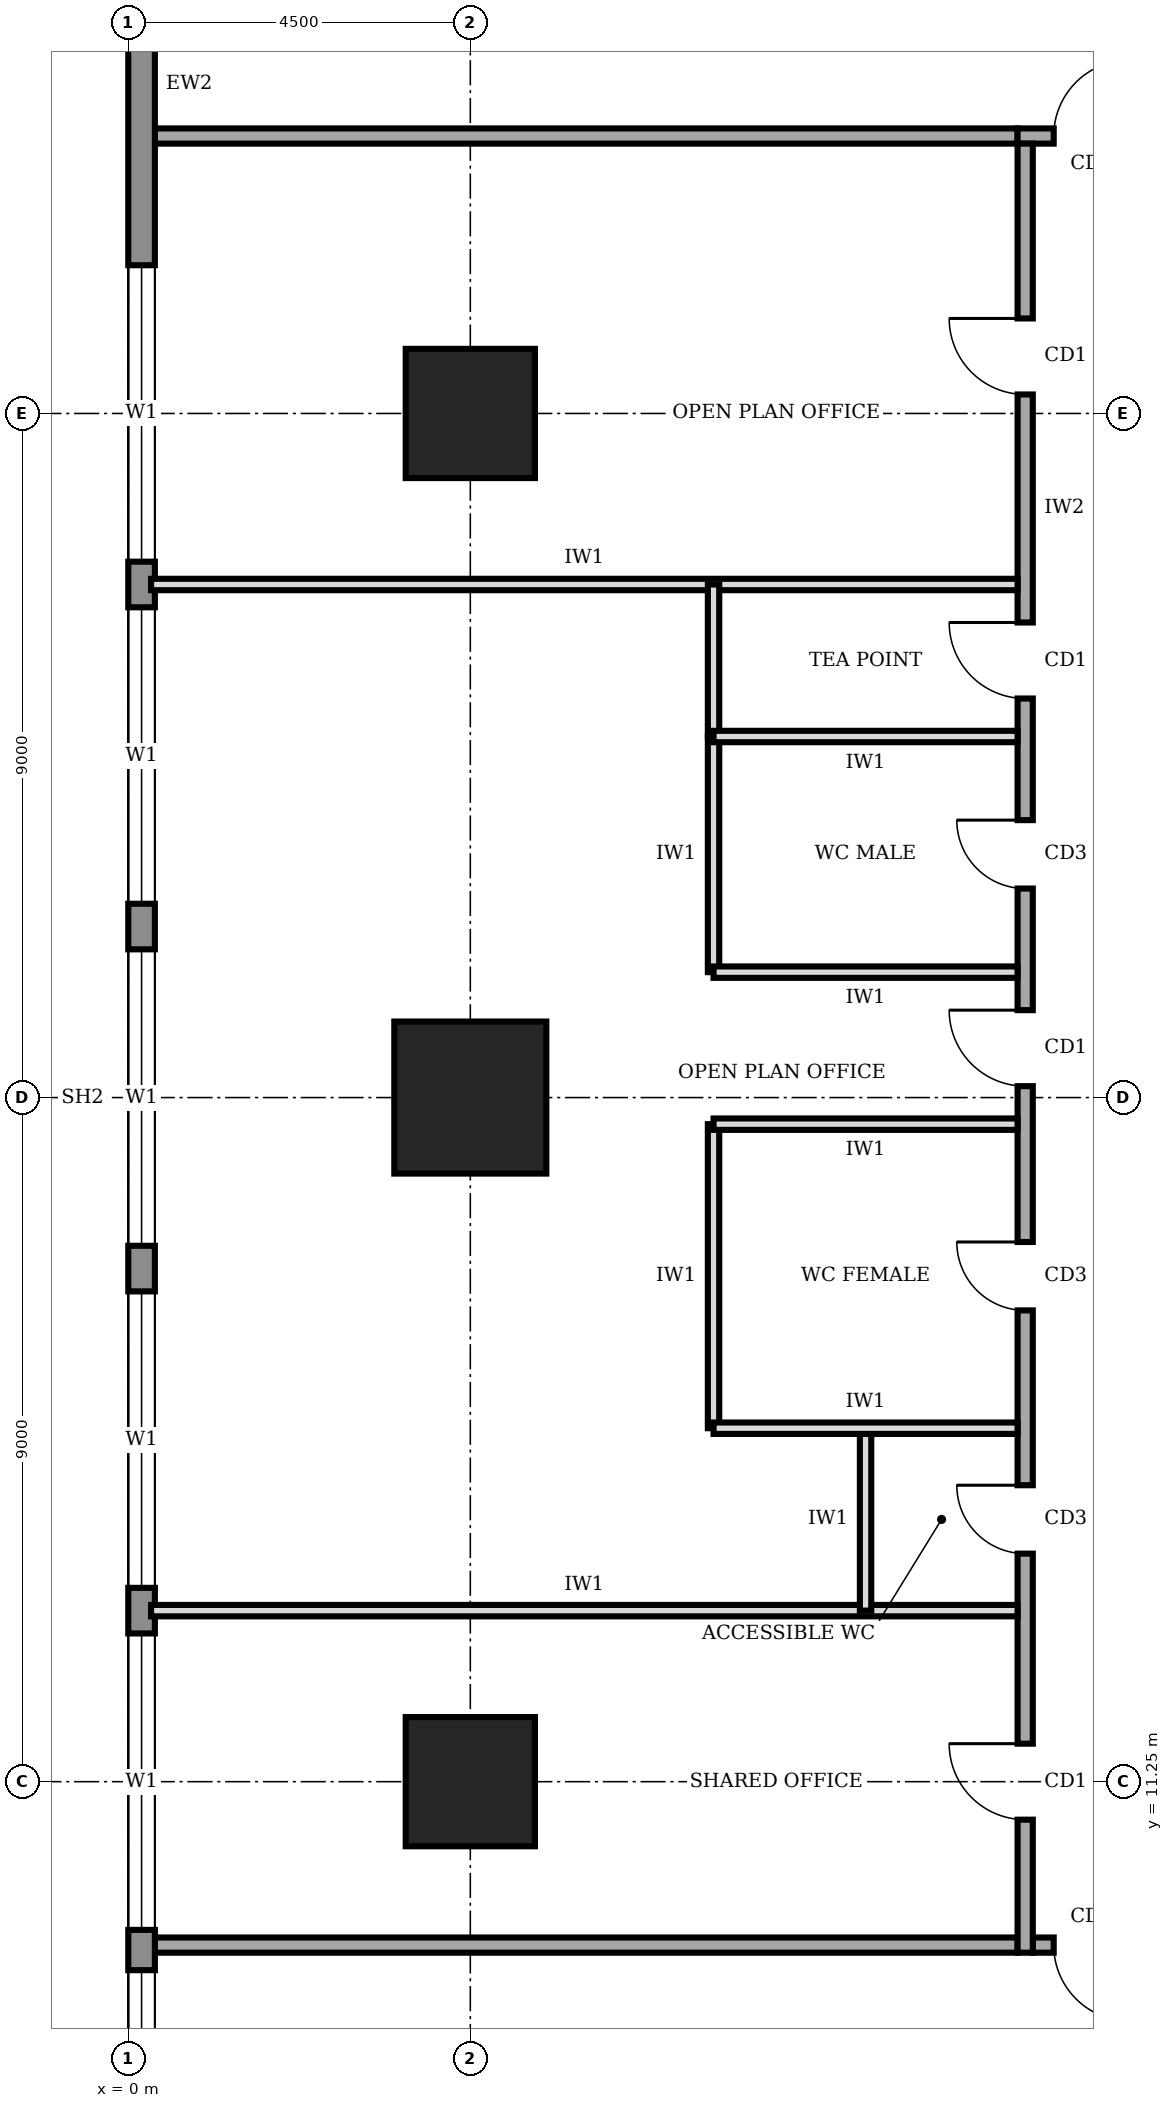
"""IFC4 building model, lengths in metres.
Left out: names, types, materials, properties, quantities, classifications, styles, units other than length and angle.
Written with IfcOpenShell. Run it as: python <this file> out.ifc"""

import sys

from ifc_helpers import new_model, si_unit, direction, frame, frame_2d, origin, origin_2d, place, context, subcontext, project, spatial, rectangle, extrude, element, fill, save


model = new_model("IFC4")
c1 = context("Model", 3, precision=1e-05, world=origin(), true_north=direction((0.0, 1.0)))
c2 = subcontext(c1, "Body", "Model", "MODEL_VIEW")
j1 = project(units=[si_unit("LENGTHUNIT", "METRE"), si_unit("PLANEANGLEUNIT", "RADIAN")], contexts=[c1])
p1 = place(None, origin())
s1 = spatial("IfcSite", under=j1, at=p1, CompositionType="ELEMENT")
p2 = place(p1, origin())
s2 = spatial("IfcBuilding", under=s1, at=p2, CompositionType="ELEMENT")
p3 = place(p2, frame((0.0, 0.0, 281.0)))
s3 = spatial("IfcBuildingStorey", under=s2, at=p3, CompositionType="ELEMENT", Elevation=281.0)
p4 = place(p3, frame((4.5, 11.25, 0.0), z_axis=(0.0, 0.0, 1.0), x_axis=(1.0, 0.0, 0.0)))
e1 = element("IfcColumn", 1, at=p4, inside=s3, PredefinedType="COLUMN", context=c2, shape_type="SweptSolid", body=[
    extrude(rectangle(XDim=1.7, YDim=1.7, at=origin_2d()), origin(), (0.0, 0.0, 1.0), 4.0),
])
p5 = place(p3, frame((4.5, 20.25, 0.0), z_axis=(0.0, 0.0, 1.0), x_axis=(1.0, 0.0, 0.0)))
e2 = element("IfcColumn", 2, at=p5, inside=s3, PredefinedType="COLUMN", context=c2, shape_type="SweptSolid", body=[
    extrude(rectangle(XDim=2.0, YDim=2.0, at=origin_2d()), origin(), (0.0, 0.0, 1.0), 4.0),
])
p6 = place(p3, frame((4.5, 29.25, 0.0), z_axis=(0.0, 0.0, 1.0), x_axis=(1.0, 0.0, 0.0)))
e3 = element("IfcColumn", 3, at=p6, inside=s3, PredefinedType="COLUMN", context=c2, shape_type="SweptSolid", body=[
    extrude(rectangle(XDim=1.7, YDim=1.7, at=origin_2d()), origin(), (0.0, 0.0, 1.0), 4.0),
])
p7 = place(p3, frame((0.175, 35.98, 0.0), z_axis=(0.0, 0.0, 1.0), x_axis=(0.0, -1.0, 0.0)))
e4 = element("IfcWall", 4, at=p7, inside=s3, PredefinedType="STANDARD", context=c2, shape_type="SweptSolid", body=[
    extrude(rectangle(XDim=31.46, YDim=0.35, at=frame_2d((15.73, 0.0))), origin(), (0.0, 0.0, 1.0), 3.75),
])
p8 = place(p7, frame((27.21, 0.0, 0.9)))
e5 = element("IfcOpeningElement", 5, at=p8, cuts=e4, PredefinedType="OPENING", context=c2, shape_type="SweptSolid", body=[
    extrude(rectangle(XDim=3.9, YDim=2.2, at=frame_2d((1.95, 1.1))), frame((0.0, 0.185, 0.0), z_axis=(0.0, -1.0, 0.0), x_axis=(1.0, 0.0, 0.0)), (0.0, 0.0, 1.0), 0.37),
])
p9 = place(p7, frame((22.78, 0.0, 0.9)))
e6 = element("IfcOpeningElement", 6, at=p9, cuts=e4, PredefinedType="OPENING", context=c2, shape_type="SweptSolid", body=[
    extrude(rectangle(XDim=3.9, YDim=2.2, at=frame_2d((1.95, 1.1))), frame((0.0, 0.185, 0.0), z_axis=(0.0, -1.0, 0.0), x_axis=(1.0, 0.0, 0.0)), (0.0, 0.0, 1.0), 0.37),
])
p10 = place(p7, frame((18.28, 0.0, 0.9)))
e7 = element("IfcOpeningElement", 7, at=p10, cuts=e4, PredefinedType="OPENING", context=c2, shape_type="SweptSolid", body=[
    extrude(rectangle(XDim=3.9, YDim=2.2, at=frame_2d((1.95, 1.1))), frame((0.0, 0.185, 0.0), z_axis=(0.0, -1.0, 0.0), x_axis=(1.0, 0.0, 0.0)), (0.0, 0.0, 1.0), 0.37),
])
p11 = place(p7, frame((13.78, 0.0, 0.9)))
e8 = element("IfcOpeningElement", 8, at=p11, cuts=e4, PredefinedType="OPENING", context=c2, shape_type="SweptSolid", body=[
    extrude(rectangle(XDim=3.9, YDim=2.2, at=frame_2d((1.95, 1.1))), frame((0.0, 0.185, 0.0), z_axis=(0.0, -1.0, 0.0), x_axis=(1.0, 0.0, 0.0)), (0.0, 0.0, 1.0), 0.37),
])
p12 = place(p7, frame((9.28, 0.0, 0.9)))
e9 = element("IfcOpeningElement", 9, at=p12, cuts=e4, PredefinedType="OPENING", context=c2, shape_type="SweptSolid", body=[
    extrude(rectangle(XDim=3.9, YDim=2.2, at=frame_2d((1.95, 1.1))), frame((0.0, 0.185, 0.0), z_axis=(0.0, -1.0, 0.0), x_axis=(1.0, 0.0, 0.0)), (0.0, 0.0, 1.0), 0.37),
])
p13 = place(p7, frame((4.78, 0.0, 0.9)))
e10 = element("IfcOpeningElement", 10, at=p13, cuts=e4, PredefinedType="OPENING", context=c2, shape_type="SweptSolid", body=[
    extrude(rectangle(XDim=3.9, YDim=2.2, at=frame_2d((1.95, 1.1))), frame((0.0, 0.185, 0.0), z_axis=(0.0, -1.0, 0.0), x_axis=(1.0, 0.0, 0.0)), (0.0, 0.0, 1.0), 0.37),
])
p14 = place(p3, frame((11.9, 9.1, 0.0), z_axis=(0.0, 0.0, 1.0), x_axis=(1.0, 0.0, 0.0)))
e11 = element("IfcWall", 11, at=p14, inside=s3, PredefinedType="SOLIDWALL", context=c2, shape_type="SweptSolid", body=[
    extrude(rectangle(XDim=16.9, YDim=0.2, at=frame_2d((8.45, 0.0))), origin(), (0.0, 0.0, 1.0), 3.75),
])
p15 = place(p14, frame((0.275, 0.0, 0.0)))
e12 = element("IfcOpeningElement", 12, at=p15, cuts=e11, PredefinedType="OPENING", context=c2, shape_type="SweptSolid", body=[
    extrude(rectangle(XDim=1.0, YDim=2.1, at=frame_2d((0.5, 1.05))), frame((0.0, 0.11, 0.0), z_axis=(0.0, -1.0, 0.0), x_axis=(1.0, 0.0, 0.0)), (0.0, 0.0, 1.0), 0.22),
])
p16 = place(p14, frame((8.35, 0.0, 0.0)))
e13 = element("IfcOpeningElement", 13, at=p16, cuts=e11, PredefinedType="OPENING", context=c2, shape_type="SweptSolid", body=[
    extrude(rectangle(XDim=1.8, YDim=2.1, at=frame_2d((0.9, 1.05))), frame((0.0, 0.11, 0.0), z_axis=(0.0, -1.0, 0.0), x_axis=(1.0, 0.0, 0.0)), (0.0, 0.0, 1.0), 0.22),
])
p17 = place(p3, frame((28.6, 32.9, 0.0), z_axis=(0.0, 0.0, 1.0), x_axis=(-1.0, 0.0, 0.0)))
e14 = element("IfcWall", 14, at=p17, inside=s3, PredefinedType="SOLIDWALL", context=c2, shape_type="SweptSolid", body=[
    extrude(rectangle(XDim=16.9, YDim=0.2, at=frame_2d((8.45, 0.0))), origin(), (0.0, 0.0, 1.0), 3.75),
])
p18 = place(p17, frame((15.425, 0.0, 0.0)))
e15 = element("IfcOpeningElement", 15, at=p18, cuts=e14, PredefinedType="OPENING", context=c2, shape_type="SweptSolid", body=[
    extrude(rectangle(XDim=1.0, YDim=2.1, at=frame_2d((0.5, 1.05))), frame((0.0, 0.11, 0.0), z_axis=(0.0, -1.0, 0.0), x_axis=(1.0, 0.0, 0.0)), (0.0, 0.0, 1.0), 0.22),
])
p19 = place(p17, frame((7.45, 0.0, 0.0)))
e16 = element("IfcOpeningElement", 16, at=p19, cuts=e14, PredefinedType="OPENING", context=c2, shape_type="SweptSolid", body=[
    extrude(rectangle(XDim=1.8, YDim=2.1, at=frame_2d((0.9, 1.05))), frame((0.0, 0.11, 0.0), z_axis=(0.0, -1.0, 0.0), x_axis=(1.0, 0.0, 0.0)), (0.0, 0.0, 1.0), 0.22),
])
p20 = place(p17, frame((0.275, 0.0, 0.0)))
e17 = element("IfcOpeningElement", 17, at=p20, cuts=e14, PredefinedType="OPENING", context=c2, shape_type="SweptSolid", body=[
    extrude(rectangle(XDim=1.0, YDim=2.1, at=frame_2d((0.5, 1.05))), frame((0.0, 0.11, 0.0), z_axis=(0.0, -1.0, 0.0), x_axis=(1.0, 0.0, 0.0)), (0.0, 0.0, 1.0), 0.22),
])
p21 = place(p3, frame((11.8, 32.8, 0.0), z_axis=(0.0, 0.0, 1.0), x_axis=(0.0, -1.0, 0.0)))
e18 = element("IfcWall", 18, at=p21, inside=s3, PredefinedType="SOLIDWALL", context=c2, shape_type="SweptSolid", body=[
    extrude(rectangle(XDim=23.8, YDim=0.2, at=frame_2d((11.9, 0.0))), origin(), (0.0, 0.0, 1.0), 3.75),
])
p22 = place(p21, frame((21.05, 0.0, 0.0)))
e19 = element("IfcOpeningElement", 19, at=p22, cuts=e18, PredefinedType="OPENING", context=c2, shape_type="SweptSolid", body=[
    extrude(rectangle(XDim=1.0, YDim=2.1, at=frame_2d((0.5, 1.05))), frame((0.0, 0.11, 0.0), z_axis=(0.0, -1.0, 0.0), x_axis=(1.0, 0.0, 0.0)), (0.0, 0.0, 1.0), 0.22),
])
p23 = place(p21, frame((17.65, 0.0, 0.0)))
e20 = element("IfcOpeningElement", 20, at=p23, cuts=e18, PredefinedType="OPENING", context=c2, shape_type="SweptSolid", body=[
    extrude(rectangle(XDim=0.9, YDim=2.1, at=frame_2d((0.45, 1.05))), frame((0.0, 0.11, 0.0), z_axis=(0.0, -1.0, 0.0), x_axis=(1.0, 0.0, 0.0)), (0.0, 0.0, 1.0), 0.22),
])
p24 = place(p21, frame((14.45, 0.0, 0.0)))
e21 = element("IfcOpeningElement", 21, at=p24, cuts=e18, PredefinedType="OPENING", context=c2, shape_type="SweptSolid", body=[
    extrude(rectangle(XDim=0.9, YDim=2.1, at=frame_2d((0.45, 1.05))), frame((0.0, 0.11, 0.0), z_axis=(0.0, -1.0, 0.0), x_axis=(1.0, 0.0, 0.0)), (0.0, 0.0, 1.0), 0.22),
])
p25 = place(p21, frame((8.9, 0.0, 0.0)))
e22 = element("IfcOpeningElement", 22, at=p25, cuts=e18, PredefinedType="OPENING", context=c2, shape_type="SweptSolid", body=[
    extrude(rectangle(XDim=0.9, YDim=2.1, at=frame_2d((0.45, 1.05))), frame((0.0, 0.11, 0.0), z_axis=(0.0, -1.0, 0.0), x_axis=(1.0, 0.0, 0.0)), (0.0, 0.0, 1.0), 0.22),
])
p26 = place(p21, frame((6.3, 0.0, 0.0)))
e23 = element("IfcOpeningElement", 23, at=p26, cuts=e18, PredefinedType="OPENING", context=c2, shape_type="SweptSolid", body=[
    extrude(rectangle(XDim=1.0, YDim=2.1, at=frame_2d((0.5, 1.05))), frame((0.0, 0.11, 0.0), z_axis=(0.0, -1.0, 0.0), x_axis=(1.0, 0.0, 0.0)), (0.0, 0.0, 1.0), 0.22),
])
p27 = place(p21, frame((11.4, 0.0, 0.0)))
e24 = element("IfcOpeningElement", 24, at=p27, cuts=e18, PredefinedType="OPENING", context=c2, shape_type="SweptSolid", body=[
    extrude(rectangle(XDim=1.0, YDim=2.1, at=frame_2d((0.5, 1.05))), frame((0.0, 0.11, 0.0), z_axis=(0.0, -1.0, 0.0), x_axis=(1.0, 0.0, 0.0)), (0.0, 0.0, 1.0), 0.22),
])
p28 = place(p21, frame((2.3, 0.0, 0.0)))
e25 = element("IfcOpeningElement", 25, at=p28, cuts=e18, PredefinedType="OPENING", context=c2, shape_type="SweptSolid", body=[
    extrude(rectangle(XDim=1.0, YDim=2.1, at=frame_2d((0.5, 1.05))), frame((0.0, 0.11, 0.0), z_axis=(0.0, -1.0, 0.0), x_axis=(1.0, 0.0, 0.0)), (0.0, 0.0, 1.0), 0.22),
])
for number, where, z_axis, x_axis in (
    (26, (0.3, 9.1, 0.0), (0.0, 0.0, 1.0), (1.0, 0.0, 0.0)),
    (27, (0.3, 32.9, 0.0), (0.0, 0.0, 1.0), (1.0, 0.0, 0.0)),
):
    element("IfcWall", number, at=place(p3, frame(where, z_axis=z_axis, x_axis=x_axis)), inside=s3, PredefinedType="SOLIDWALL", context=c2, shape_type="SweptSolid", body=[
        extrude(rectangle(XDim=11.4, YDim=0.2, at=frame_2d((5.7, 0.0))), origin(), (0.0, 0.0, 1.0), 3.75),
    ])
for number, where, z_axis, x_axis in (
    (28, (0.3, 13.5, 0.0), (0.0, 0.0, 1.0), (1.0, 0.0, 0.0)),
    (29, (0.3, 27.0, 0.0), (0.0, 0.0, 1.0), (1.0, 0.0, 0.0)),
):
    element("IfcWall", number, at=place(p3, frame(where, z_axis=z_axis, x_axis=x_axis)), inside=s3, PredefinedType="PARTITIONING", context=c2, shape_type="SweptSolid", body=[
        extrude(rectangle(XDim=11.4, YDim=0.15, at=frame_2d((5.7, 0.0))), origin(), (0.0, 0.0, 1.0), 3.75),
    ])
p29 = place(p3, frame((11.7, 15.9, 0.0), z_axis=(0.0, 0.0, 1.0), x_axis=(-1.0, 0.0, 0.0)))
e30 = element("IfcWall", 30, at=p29, inside=s3, PredefinedType="PARTITIONING", context=c2, shape_type="SweptSolid", body=[
    extrude(rectangle(XDim=4.0, YDim=0.15, at=frame_2d((2.0, 0.0))), origin(), (0.0, 0.0, 1.0), 3.75),
])
p30 = place(p3, frame((11.7, 19.9, 0.0), z_axis=(0.0, 0.0, 1.0), x_axis=(-1.0, 0.0, 0.0)))
e31 = element("IfcWall", 31, at=p30, inside=s3, PredefinedType="PARTITIONING", context=c2, shape_type="SweptSolid", body=[
    extrude(rectangle(XDim=4.0, YDim=0.15, at=frame_2d((2.0, 0.0))), origin(), (0.0, 0.0, 1.0), 2.85),
])
for number, where, z_axis, x_axis in (
    (32, (11.7, 21.9, 0.0), (0.0, 0.0, 1.0), (-1.0, 0.0, 0.0)),
    (33, (11.7, 25.0, 0.0), (0.0, 0.0, 1.0), (-1.0, 0.0, 0.0)),
):
    element("IfcWall", number, at=place(p3, frame(where, z_axis=z_axis, x_axis=x_axis)), inside=s3, PredefinedType="PARTITIONING", context=c2, shape_type="SweptSolid", body=[
        extrude(rectangle(XDim=4.0, YDim=0.15, at=frame_2d((2.0, 0.0))), origin(), (0.0, 0.0, 1.0), 3.75),
    ])
p31 = place(p3, frame((9.7, 13.5, 0.0), z_axis=(0.0, 0.0, 1.0), x_axis=(0.0, 1.0, 0.0)))
e34 = element("IfcWall", 34, at=p31, inside=s3, PredefinedType="PARTITIONING", context=c2, shape_type="SweptSolid", body=[
    extrude(rectangle(XDim=2.4, YDim=0.15, at=frame_2d((1.2, 0.0))), origin(), (0.0, 0.0, 1.0), 3.75),
])
p32 = place(p3, frame((7.7, 15.9, 0.0), z_axis=(0.0, 0.0, 1.0), x_axis=(0.0, 1.0, 0.0)))
e35 = element("IfcWall", 35, at=p32, inside=s3, PredefinedType="PARTITIONING", context=c2, shape_type="SweptSolid", body=[
    extrude(rectangle(XDim=4.0, YDim=0.15, at=frame_2d((2.0, 0.0))), origin(), (0.0, 0.0, 1.0), 3.75),
])
p33 = place(p3, frame((7.7, 21.9, 0.0), z_axis=(0.0, 0.0, 1.0), x_axis=(0.0, 1.0, 0.0)))
e36 = element("IfcWall", 36, at=p33, inside=s3, PredefinedType="PARTITIONING", context=c2, shape_type="SweptSolid", body=[
    extrude(rectangle(XDim=3.1, YDim=0.15, at=frame_2d((1.55, 0.0))), origin(), (0.0, 0.0, 1.0), 3.75),
])
p34 = place(p3, frame((7.7, 25.0, 0.0), z_axis=(0.0, 0.0, 1.0), x_axis=(0.0, 1.0, 0.0)))
e37 = element("IfcWall", 37, at=p34, inside=s3, PredefinedType="PARTITIONING", context=c2, shape_type="SweptSolid", body=[
    extrude(rectangle(XDim=2.0, YDim=0.15, at=frame_2d((1.0, 0.0))), origin(), (0.0, 0.0, 1.0), 3.75),
])
p35 = place(p8, origin())
e38 = element("IfcWindow", 38, at=p35, inside=s3, PartitioningType="SINGLE_PANEL", PredefinedType="WINDOW", context=c2, shape_type="SweptSolid", body=[
    extrude(rectangle(XDim=3.9, YDim=2.2, at=frame_2d((1.95, 1.1))), frame((0.0, 0.03, 0.0), z_axis=(0.0, -1.0, 0.0), x_axis=(1.0, 0.0, 0.0)), (0.0, 0.0, 1.0), 0.06),
])
fill(e5, e38)
p36 = place(p9, origin())
e39 = element("IfcWindow", 39, at=p36, inside=s3, PartitioningType="SINGLE_PANEL", PredefinedType="WINDOW", context=c2, shape_type="SweptSolid", body=[
    extrude(rectangle(XDim=3.9, YDim=2.2, at=frame_2d((1.95, 1.1))), frame((0.0, 0.03, 0.0), z_axis=(0.0, -1.0, 0.0), x_axis=(1.0, 0.0, 0.0)), (0.0, 0.0, 1.0), 0.06),
])
fill(e6, e39)
p37 = place(p10, origin())
e40 = element("IfcWindow", 40, at=p37, inside=s3, PartitioningType="SINGLE_PANEL", PredefinedType="WINDOW", context=c2, shape_type="SweptSolid", body=[
    extrude(rectangle(XDim=3.9, YDim=2.2, at=frame_2d((1.95, 1.1))), frame((0.0, 0.03, 0.0), z_axis=(0.0, -1.0, 0.0), x_axis=(1.0, 0.0, 0.0)), (0.0, 0.0, 1.0), 0.06),
])
fill(e7, e40)
p38 = place(p11, origin())
e41 = element("IfcWindow", 41, at=p38, inside=s3, PartitioningType="SINGLE_PANEL", PredefinedType="WINDOW", context=c2, shape_type="SweptSolid", body=[
    extrude(rectangle(XDim=3.9, YDim=2.2, at=frame_2d((1.95, 1.1))), frame((0.0, 0.03, 0.0), z_axis=(0.0, -1.0, 0.0), x_axis=(1.0, 0.0, 0.0)), (0.0, 0.0, 1.0), 0.06),
])
fill(e8, e41)
p39 = place(p12, origin())
e42 = element("IfcWindow", 42, at=p39, inside=s3, PartitioningType="SINGLE_PANEL", PredefinedType="WINDOW", context=c2, shape_type="SweptSolid", body=[
    extrude(rectangle(XDim=3.9, YDim=2.2, at=frame_2d((1.95, 1.1))), frame((0.0, 0.03, 0.0), z_axis=(0.0, -1.0, 0.0), x_axis=(1.0, 0.0, 0.0)), (0.0, 0.0, 1.0), 0.06),
])
fill(e9, e42)
p40 = place(p13, origin())
e43 = element("IfcWindow", 43, at=p40, inside=s3, PartitioningType="SINGLE_PANEL", PredefinedType="WINDOW", context=c2, shape_type="SweptSolid", body=[
    extrude(rectangle(XDim=3.9, YDim=2.2, at=frame_2d((1.95, 1.1))), frame((0.0, 0.03, 0.0), z_axis=(0.0, -1.0, 0.0), x_axis=(1.0, 0.0, 0.0)), (0.0, 0.0, 1.0), 0.06),
])
fill(e10, e43)
p41 = place(p15, frame((1.0, 0.0, 0.0), z_axis=(0.0, 0.0, 1.0), x_axis=(-1.0, 0.0, 0.0)))
e44 = element("IfcDoor", 44, at=p41, inside=s3, OperationType="SINGLE_SWING_LEFT", PredefinedType="DOOR", context=c2, shape_type="SweptSolid", body=[
    extrude(rectangle(XDim=1.0, YDim=2.1, at=frame_2d((0.5, 1.05))), frame((0.0, 0.025, 0.0), z_axis=(0.0, -1.0, 0.0), x_axis=(1.0, 0.0, 0.0)), (0.0, 0.0, 1.0), 0.05),
])
fill(e12, e44)
p42 = place(p18, frame((1.0, 0.0, 0.0), z_axis=(0.0, 0.0, 1.0), x_axis=(-1.0, 0.0, 0.0)))
e45 = element("IfcDoor", 45, at=p42, inside=s3, OperationType="SINGLE_SWING_RIGHT", PredefinedType="DOOR", context=c2, shape_type="SweptSolid", body=[
    extrude(rectangle(XDim=1.0, YDim=2.1, at=frame_2d((0.5, 1.05))), frame((0.0, 0.025, 0.0), z_axis=(0.0, -1.0, 0.0), x_axis=(1.0, 0.0, 0.0)), (0.0, 0.0, 1.0), 0.05),
])
fill(e15, e45)
p43 = place(p22, frame((1.0, 0.0, 0.0), z_axis=(0.0, 0.0, 1.0), x_axis=(-1.0, 0.0, 0.0)))
e46 = element("IfcDoor", 46, at=p43, inside=s3, OperationType="SINGLE_SWING_RIGHT", PredefinedType="DOOR", context=c2, shape_type="SweptSolid", body=[
    extrude(rectangle(XDim=1.0, YDim=2.1, at=frame_2d((0.5, 1.05))), frame((0.0, 0.025, 0.0), z_axis=(0.0, -1.0, 0.0), x_axis=(1.0, 0.0, 0.0)), (0.0, 0.0, 1.0), 0.05),
])
fill(e19, e46)
p44 = place(p23, frame((0.9, 0.0, 0.0), z_axis=(0.0, 0.0, 1.0), x_axis=(-1.0, 0.0, 0.0)))
e47 = element("IfcDoor", 47, at=p44, inside=s3, OperationType="SINGLE_SWING_RIGHT", PredefinedType="DOOR", context=c2, shape_type="SweptSolid", body=[
    extrude(rectangle(XDim=0.9, YDim=2.1, at=frame_2d((0.45, 1.05))), frame((0.0, 0.025, 0.0), z_axis=(0.0, -1.0, 0.0), x_axis=(1.0, 0.0, 0.0)), (0.0, 0.0, 1.0), 0.05),
])
fill(e20, e47)
p45 = place(p24, frame((0.9, 0.0, 0.0), z_axis=(0.0, 0.0, 1.0), x_axis=(-1.0, 0.0, 0.0)))
e48 = element("IfcDoor", 48, at=p45, inside=s3, OperationType="SINGLE_SWING_RIGHT", PredefinedType="DOOR", context=c2, shape_type="SweptSolid", body=[
    extrude(rectangle(XDim=0.9, YDim=2.1, at=frame_2d((0.45, 1.05))), frame((0.0, 0.025, 0.0), z_axis=(0.0, -1.0, 0.0), x_axis=(1.0, 0.0, 0.0)), (0.0, 0.0, 1.0), 0.05),
])
fill(e21, e48)
p46 = place(p25, frame((0.9, 0.0, 0.0), z_axis=(0.0, 0.0, 1.0), x_axis=(-1.0, 0.0, 0.0)))
e49 = element("IfcDoor", 49, at=p46, inside=s3, OperationType="SINGLE_SWING_RIGHT", PredefinedType="DOOR", context=c2, shape_type="SweptSolid", body=[
    extrude(rectangle(XDim=0.9, YDim=2.1, at=frame_2d((0.45, 1.05))), frame((0.0, 0.025, 0.0), z_axis=(0.0, -1.0, 0.0), x_axis=(1.0, 0.0, 0.0)), (0.0, 0.0, 1.0), 0.05),
])
fill(e22, e49)
p47 = place(p26, frame((1.0, 0.0, 0.0), z_axis=(0.0, 0.0, 1.0), x_axis=(-1.0, 0.0, 0.0)))
e50 = element("IfcDoor", 50, at=p47, inside=s3, OperationType="SINGLE_SWING_RIGHT", PredefinedType="DOOR", context=c2, shape_type="SweptSolid", body=[
    extrude(rectangle(XDim=1.0, YDim=2.1, at=frame_2d((0.5, 1.05))), frame((0.0, 0.025, 0.0), z_axis=(0.0, -1.0, 0.0), x_axis=(1.0, 0.0, 0.0)), (0.0, 0.0, 1.0), 0.05),
])
fill(e23, e50)
p48 = place(p27, frame((1.0, 0.0, 0.0), z_axis=(0.0, 0.0, 1.0), x_axis=(-1.0, 0.0, 0.0)))
e51 = element("IfcDoor", 51, at=p48, inside=s3, OperationType="SINGLE_SWING_RIGHT", PredefinedType="DOOR", context=c2, shape_type="SweptSolid", body=[
    extrude(rectangle(XDim=1.0, YDim=2.1, at=frame_2d((0.5, 1.05))), frame((0.0, 0.025, 0.0), z_axis=(0.0, -1.0, 0.0), x_axis=(1.0, 0.0, 0.0)), (0.0, 0.0, 1.0), 0.05),
])
fill(e24, e51)
p49 = place(p28, frame((1.0, 0.0, 0.0), z_axis=(0.0, 0.0, 1.0), x_axis=(-1.0, 0.0, 0.0)))
e52 = element("IfcDoor", 52, at=p49, inside=s3, OperationType="SINGLE_SWING_RIGHT", PredefinedType="DOOR", context=c2, shape_type="SweptSolid", body=[
    extrude(rectangle(XDim=1.0, YDim=2.1, at=frame_2d((0.5, 1.05))), frame((0.0, 0.025, 0.0), z_axis=(0.0, -1.0, 0.0), x_axis=(1.0, 0.0, 0.0)), (0.0, 0.0, 1.0), 0.05),
])
fill(e25, e52)
save(model, sys.argv[1])
